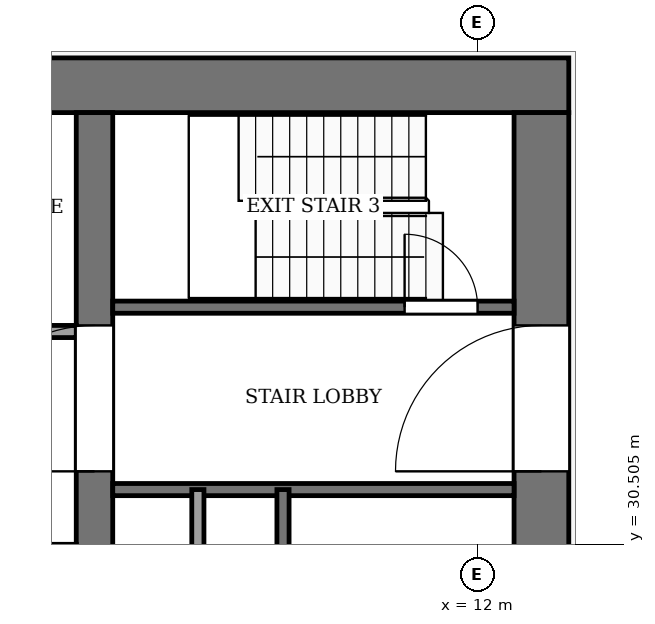
"""IFC4 building model, lengths in metres.
Left out: names, types, materials, properties, quantities, classifications, styles, units other than length and angle.
Written with IfcOpenShell. Run it as: python <this file> out.ifc"""

import sys

from ifc_helpers import new_model, si_unit, direction, frame, frame_2d, origin, place, context, subcontext, project, spatial, rectangle, extrude, element, fill, save


model = new_model("IFC4")
c1 = context("Model", 3, precision=1e-05, world=origin(), true_north=direction((0.0, 1.0)))
c2 = subcontext(c1, "Body", "Model", "MODEL_VIEW")
j1 = project(units=[si_unit("LENGTHUNIT", "METRE"), si_unit("PLANEANGLEUNIT", "RADIAN")], contexts=[c1])
p1 = place(None, origin())
s1 = spatial("IfcSite", under=j1, at=p1, CompositionType="ELEMENT")
p2 = place(p1, origin())
s2 = spatial("IfcBuilding", under=s1, at=p2, CompositionType="ELEMENT")
p3 = place(p2, frame((0.0, 0.0, 210.0)))
s3 = spatial("IfcBuildingStorey", under=s2, at=p3, CompositionType="ELEMENT", Elevation=210.0)
p4 = place(p3, frame((-13.5, 38.05, -0.13), z_axis=(0.0, 0.0, 1.0), x_axis=(1.0, 0.0, 0.0)))
e1 = element("IfcWall", 1, at=p4, inside=s3, PredefinedType="SHEAR", context=c2, shape_type="SweptSolid", body=[
    extrude(rectangle(XDim=27.0, YDim=0.9, at=frame_2d((13.5, 0.0))), origin(), (0.0, 0.0, 1.0), 4.0),
])
p5 = place(p3, frame((13.05, 18.4, -0.13), z_axis=(0.0, 0.0, 1.0), x_axis=(0.0, 1.0, 0.0)))
e2 = element("IfcWall", 2, at=p5, inside=s3, PredefinedType="SHEAR", context=c2, shape_type="SweptSolid", body=[
    extrude(rectangle(XDim=19.2, YDim=0.9, at=frame_2d((9.6, 0.0))), origin(), (0.0, 0.0, 1.0), 4.0),
])
p6 = place(p5, frame((2.8, 0.0, 0.13)))
e3 = element("IfcOpeningElement", 3, at=p6, cuts=e2, PredefinedType="OPENING", context=c2, shape_type="SweptSolid", body=[
    extrude(rectangle(XDim=2.4, YDim=2.4, at=frame_2d((1.2, 1.2))), frame((0.0, 0.46, 0.0), z_axis=(0.0, -1.0, 0.0), x_axis=(1.0, 0.0, 0.0)), (0.0, 0.0, 1.0), 0.92),
])
p7 = place(p5, frame((13.3, 0.0, 0.13)))
e4 = element("IfcOpeningElement", 4, at=p7, cuts=e2, PredefinedType="OPENING", context=c2, shape_type="SweptSolid", body=[
    extrude(rectangle(XDim=2.4, YDim=2.4, at=frame_2d((1.2, 1.2))), frame((0.0, 0.46, 0.0), z_axis=(0.0, -1.0, 0.0), x_axis=(1.0, 0.0, 0.0)), (0.0, 0.0, 1.0), 0.92),
])
p8 = place(p3, frame((5.7, 18.4, -0.13), z_axis=(0.0, 0.0, 1.0), x_axis=(0.0, 1.0, 0.0)))
e5 = element("IfcWall", 5, at=p8, inside=s3, PredefinedType="SHEAR", context=c2, shape_type="SweptSolid", body=[
    extrude(rectangle(XDim=19.2, YDim=0.6, at=frame_2d((9.6, 0.0))), origin(), (0.0, 0.0, 1.0), 4.0),
])
p9 = place(p8, frame((13.3, 0.0, 0.13)))
e6 = element("IfcOpeningElement", 6, at=p9, cuts=e5, PredefinedType="OPENING", context=c2, shape_type="SweptSolid", body=[
    extrude(rectangle(XDim=2.4, YDim=2.4, at=frame_2d((1.2, 1.2))), frame((0.0, 0.31, 0.0), z_axis=(0.0, -1.0, 0.0), x_axis=(1.0, 0.0, 0.0)), (0.0, 0.0, 1.0), 0.62),
])
p10 = place(p3, frame((6.0, 31.4, 0.0), z_axis=(0.0, 0.0, 1.0), x_axis=(1.0, 0.0, 0.0)))
e7 = element("IfcWall", 7, at=p10, inside=s3, PredefinedType="PARTITIONING", context=c2, shape_type="SweptSolid", body=[
    extrude(rectangle(XDim=6.6, YDim=0.2, at=frame_2d((3.3, 0.0))), origin(), (0.0, 0.0, 1.0), 3.87),
])
p11 = place(p3, frame((-5.4, 34.0, 0.0), z_axis=(0.0, 0.0, 1.0), x_axis=(1.0, 0.0, 0.0)))
e8 = element("IfcWall", 8, at=p11, inside=s3, PredefinedType="PARTITIONING", context=c2, shape_type="SweptSolid", body=[
    extrude(rectangle(XDim=10.8, YDim=0.2, at=frame_2d((5.4, 0.0))), origin(), (0.0, 0.0, 1.0), 3.87),
])
p12 = place(p11, frame((6.15, 0.0, 0.0)))
e9 = element("IfcOpeningElement", 9, at=p12, cuts=e8, PredefinedType="OPENING", context=c2, shape_type="SweptSolid", body=[
    extrude(rectangle(XDim=1.2, YDim=2.2, at=frame_2d((0.6, 1.1))), frame((0.0, 0.11, 0.0), z_axis=(0.0, -1.0, 0.0), x_axis=(1.0, 0.0, 0.0)), (0.0, 0.0, 1.0), 0.22),
])
p13 = place(p11, frame((8.95, 0.0, 0.0)))
e10 = element("IfcOpeningElement", 10, at=p13, cuts=e8, PredefinedType="OPENING", context=c2, shape_type="SweptSolid", body=[
    extrude(rectangle(XDim=1.0, YDim=2.1, at=frame_2d((0.5, 1.05))), frame((0.0, 0.11, 0.0), z_axis=(0.0, -1.0, 0.0), x_axis=(1.0, 0.0, 0.0)), (0.0, 0.0, 1.0), 0.22),
])
p14 = place(p3, frame((6.0, 34.4, 0.0), z_axis=(0.0, 0.0, 1.0), x_axis=(1.0, 0.0, 0.0)))
e11 = element("IfcWall", 11, at=p14, inside=s3, PredefinedType="PARTITIONING", context=c2, shape_type="SweptSolid", body=[
    extrude(rectangle(XDim=6.6, YDim=0.2, at=frame_2d((3.3, 0.0))), origin(), (0.0, 0.0, 1.0), 3.87),
])
p15 = place(p14, frame((4.8, 0.0, 0.0)))
e12 = element("IfcOpeningElement", 12, at=p15, cuts=e11, PredefinedType="OPENING", context=c2, shape_type="SweptSolid", body=[
    extrude(rectangle(XDim=1.2, YDim=2.2, at=frame_2d((0.6, 1.1))), frame((0.0, 0.11, 0.0), z_axis=(0.0, -1.0, 0.0), x_axis=(1.0, 0.0, 0.0)), (0.0, 0.0, 1.0), 0.22),
])
for number, where, z_axis, x_axis in (
    (13, (7.4, 24.0, 0.0), (0.0, 0.0, 1.0), (0.0, 1.0, 0.0)),
    (14, (8.8, 24.0, 0.0), (0.0, 0.0, 1.0), (0.0, 1.0, 0.0)),
):
    element("IfcWall", number, at=place(p3, frame(where, z_axis=z_axis, x_axis=x_axis)), inside=s3, PredefinedType="PARTITIONING", context=c2, shape_type="SweptSolid", body=[
        extrude(rectangle(XDim=7.4, YDim=0.2, at=frame_2d((3.7, 0.0))), origin(), (0.0, 0.0, 1.0), 3.87),
    ])
p16 = place(p15, origin())
e15 = element("IfcDoor", 15, at=p16, inside=s3, OperationType="SINGLE_SWING_LEFT", PredefinedType="DOOR", context=c2, shape_type="SweptSolid", body=[
    extrude(rectangle(XDim=1.2, YDim=2.2, at=frame_2d((0.6, 1.1))), frame((0.0, 0.025, 0.0), z_axis=(0.0, -1.0, 0.0), x_axis=(1.0, 0.0, 0.0)), (0.0, 0.0, 1.0), 0.05),
])
fill(e12, e15)
p17 = place(p9, origin())
e16 = element("IfcDoor", 16, at=p17, inside=s3, OperationType="DOUBLE_DOOR_SINGLE_SWING", PredefinedType="DOOR", context=c2, shape_type="SweptSolid", body=[
    extrude(rectangle(XDim=2.4, YDim=2.4, at=frame_2d((1.2, 1.2))), frame((0.0, 0.025, 0.0), z_axis=(0.0, -1.0, 0.0), x_axis=(1.0, 0.0, 0.0)), (0.0, 0.0, 1.0), 0.05),
])
fill(e6, e16)
p18 = place(p7, origin())
e17 = element("IfcDoor", 17, at=p18, inside=s3, OperationType="DOUBLE_DOOR_SINGLE_SWING", PredefinedType="DOOR", context=c2, shape_type="SweptSolid", body=[
    extrude(rectangle(XDim=2.4, YDim=2.4, at=frame_2d((1.2, 1.2))), frame((0.0, 0.025, 0.0), z_axis=(0.0, -1.0, 0.0), x_axis=(1.0, 0.0, 0.0)), (0.0, 0.0, 1.0), 0.05),
])
fill(e4, e17)
save(model, sys.argv[1])
